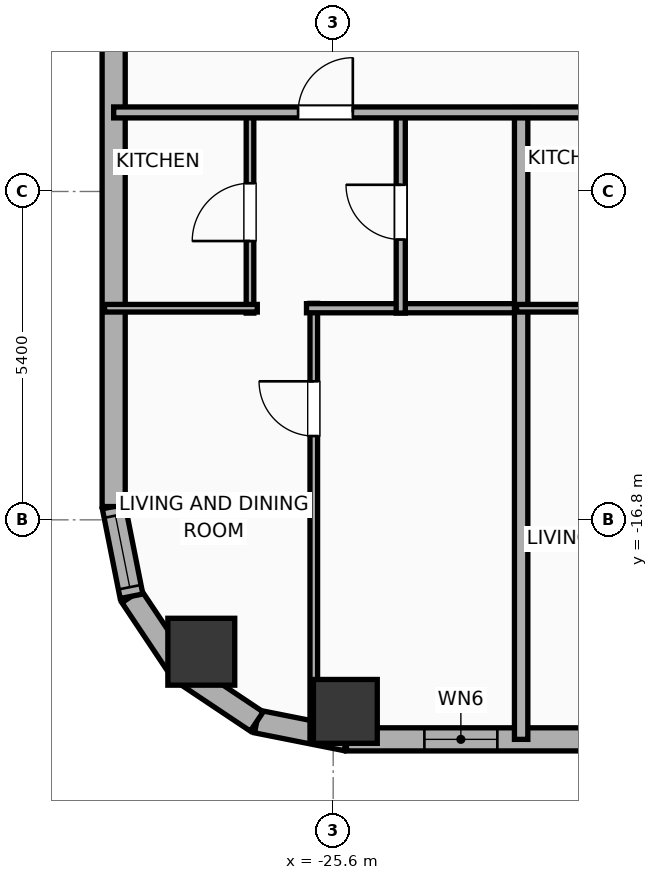
"""IFC4 building model, lengths in metres.
Left out: names, types, materials, properties, quantities, classifications, styles, units other than length and angle.
Written with IfcOpenShell. Run it as: python <this file> out.ifc"""

import sys

from ifc_helpers import new_model, si_unit, direction, frame, frame_2d, origin, origin_2d, place, context, subcontext, project, spatial, rectangle, hollow_rectangle, hollow_circle, extrude, element, fill, save


model = new_model("IFC4")
c1 = context("Model", 3, precision=1e-05, world=origin(), true_north=direction((0.0, 1.0)))
c2 = subcontext(c1, "Body", "Model", "MODEL_VIEW")
j1 = project(units=[si_unit("LENGTHUNIT", "METRE"), si_unit("PLANEANGLEUNIT", "RADIAN")], contexts=[c1])
p1 = place(None, origin())
s1 = spatial("IfcSite", under=j1, at=p1, CompositionType="ELEMENT")
p2 = place(p1, origin())
s2 = spatial("IfcBuilding", under=s1, at=p2, CompositionType="ELEMENT")
p3 = place(p2, frame((0.0, 0.0, 97.5)))
s3 = spatial("IfcBuildingStorey", under=s2, at=p3, CompositionType="ELEMENT", Elevation=97.5)
p4 = place(p3, frame((-25.4, -19.95, 0.0), z_axis=(0.0, 0.0, 1.0), x_axis=(1.0, 0.0, 0.0)))
e1 = element("IfcColumn", 1, at=p4, inside=s3, PredefinedType="COLUMN", context=c2, shape_type="SweptSolid", body=[
    extrude(hollow_rectangle(XDim=1.05, YDim=1.05, WallThickness=0.036, at=origin_2d()), origin(), (0.0, 0.0, 1.0), 3.9),
])
p5 = place(p3, frame((-27.769, -18.969, 0.0), z_axis=(0.0, 0.0, 1.0), x_axis=(1.0, 0.0, 0.0)))
e2 = element("IfcColumn", 2, at=p5, inside=s3, PredefinedType="COLUMN", context=c2, shape_type="SweptSolid", body=[
    extrude(hollow_circle(Radius=0.55, WallThickness=0.036, at=origin_2d()), origin(), (0.0, 0.0, 1.0), 3.9),
])
p6 = place(p3, frame((29.381, -20.41, 0.0), z_axis=(0.0, 0.0, 1.0), x_axis=(-1.0, 0.0, 0.0)))
e3 = element("IfcWall", 3, at=p6, inside=s3, PredefinedType="ELEMENTEDWALL", context=c2, shape_type="SweptSolid", body=[
    extrude(rectangle(XDim=54.763, YDim=0.38, at=frame_2d((27.381, 0.0))), origin(), (0.0, 0.0, 1.0), 3.65),
])
p7 = place(p6, frame((6.495, 0.0, 0.75)))
e4 = element("IfcOpeningElement", 4, at=p7, cuts=e3, PredefinedType="OPENING", context=c2, shape_type="SweptSolid", body=[
    extrude(rectangle(XDim=2.4, YDim=2.1, at=frame_2d((1.2, 1.05))), frame((0.0, 0.2, 0.0), z_axis=(0.0, -1.0, 0.0), x_axis=(1.0, 0.0, 0.0)), (0.0, 0.0, 1.0), 0.4),
])
p8 = place(p6, frame((17.686, 0.0, 0.75)))
e5 = element("IfcOpeningElement", 5, at=p8, cuts=e3, PredefinedType="OPENING", context=c2, shape_type="SweptSolid", body=[
    extrude(rectangle(XDim=2.4, YDim=2.1, at=frame_2d((1.2, 1.05))), frame((0.0, 0.2, 0.0), z_axis=(0.0, -1.0, 0.0), x_axis=(1.0, 0.0, 0.0)), (0.0, 0.0, 1.0), 0.4),
])
p9 = place(p6, frame((34.677, 0.0, 0.75)))
e6 = element("IfcOpeningElement", 6, at=p9, cuts=e3, PredefinedType="OPENING", context=c2, shape_type="SweptSolid", body=[
    extrude(rectangle(XDim=2.4, YDim=2.1, at=frame_2d((1.2, 1.05))), frame((0.0, 0.2, 0.0), z_axis=(0.0, -1.0, 0.0), x_axis=(1.0, 0.0, 0.0)), (0.0, 0.0, 1.0), 0.4),
])
p10 = place(p6, frame((45.867, 0.0, 0.75)))
e7 = element("IfcOpeningElement", 7, at=p10, cuts=e3, PredefinedType="OPENING", context=c2, shape_type="SweptSolid", body=[
    extrude(rectangle(XDim=2.4, YDim=2.1, at=frame_2d((1.2, 1.05))), frame((0.0, 0.2, 0.0), z_axis=(0.0, -1.0, 0.0), x_axis=(1.0, 0.0, 0.0)), (0.0, 0.0, 1.0), 0.4),
])
p11 = place(p6, frame((52.281, 0.0, 0.75)))
e8 = element("IfcOpeningElement", 8, at=p11, cuts=e3, PredefinedType="OPENING", context=c2, shape_type="SweptSolid", body=[
    extrude(rectangle(XDim=1.2, YDim=2.05, at=frame_2d((0.6, 1.025))), frame((0.0, 0.2, 0.0), z_axis=(0.0, -1.0, 0.0), x_axis=(1.0, 0.0, 0.0)), (0.0, 0.0, 1.0), 0.4),
])
p12 = place(p6, frame((49.641, 0.0, 0.75)))
e9 = element("IfcOpeningElement", 9, at=p12, cuts=e3, PredefinedType="OPENING", context=c2, shape_type="SweptSolid", body=[
    extrude(rectangle(XDim=1.2, YDim=2.05, at=frame_2d((0.6, 1.025))), frame((0.0, 0.2, 0.0), z_axis=(0.0, -1.0, 0.0), x_axis=(1.0, 0.0, 0.0)), (0.0, 0.0, 1.0), 0.4),
])
p13 = place(p6, frame((39.543, 0.0, 0.75)))
e10 = element("IfcOpeningElement", 10, at=p13, cuts=e3, PredefinedType="OPENING", context=c2, shape_type="SweptSolid", body=[
    extrude(rectangle(XDim=1.2, YDim=2.05, at=frame_2d((0.6, 1.025))), frame((0.0, 0.2, 0.0), z_axis=(0.0, -1.0, 0.0), x_axis=(1.0, 0.0, 0.0)), (0.0, 0.0, 1.0), 0.4),
])
p14 = place(p6, frame((44.538, 0.0, 0.75)))
e11 = element("IfcOpeningElement", 11, at=p14, cuts=e3, PredefinedType="OPENING", context=c2, shape_type="SweptSolid", body=[
    extrude(rectangle(XDim=0.52, YDim=2.05, at=frame_2d((0.26, 1.025))), frame((0.0, 0.2, 0.0), z_axis=(0.0, -1.0, 0.0), x_axis=(1.0, 0.0, 0.0)), (0.0, 0.0, 1.0), 0.4),
])
p15 = place(p6, frame((28.206, 0.0, 0.75)))
e12 = element("IfcOpeningElement", 12, at=p15, cuts=e3, PredefinedType="OPENING", context=c2, shape_type="SweptSolid", body=[
    extrude(rectangle(XDim=1.2, YDim=2.05, at=frame_2d((0.6, 1.025))), frame((0.0, 0.2, 0.0), z_axis=(0.0, -1.0, 0.0), x_axis=(1.0, 0.0, 0.0)), (0.0, 0.0, 1.0), 0.4),
])
p16 = place(p6, frame((31.241, 0.0, 0.75)))
e13 = element("IfcOpeningElement", 13, at=p16, cuts=e3, PredefinedType="OPENING", context=c2, shape_type="SweptSolid", body=[
    extrude(rectangle(XDim=0.85, YDim=2.05, at=frame_2d((0.425, 1.025))), frame((0.0, 0.2, 0.0), z_axis=(0.0, -1.0, 0.0), x_axis=(1.0, 0.0, 0.0)), (0.0, 0.0, 1.0), 0.4),
])
p17 = place(p6, frame((24.561, 0.0, 0.75)))
e14 = element("IfcOpeningElement", 14, at=p17, cuts=e3, PredefinedType="OPENING", context=c2, shape_type="SweptSolid", body=[
    extrude(rectangle(XDim=1.2, YDim=2.05, at=frame_2d((0.6, 1.025))), frame((0.0, 0.2, 0.0), z_axis=(0.0, -1.0, 0.0), x_axis=(1.0, 0.0, 0.0)), (0.0, 0.0, 1.0), 0.4),
])
p18 = place(p6, frame((22.561, 0.0, 0.75)))
e15 = element("IfcOpeningElement", 15, at=p18, cuts=e3, PredefinedType="OPENING", context=c2, shape_type="SweptSolid", body=[
    extrude(rectangle(XDim=0.52, YDim=2.05, at=frame_2d((0.26, 1.025))), frame((0.0, 0.2, 0.0), z_axis=(0.0, -1.0, 0.0), x_axis=(1.0, 0.0, 0.0)), (0.0, 0.0, 1.0), 0.4),
])
p19 = place(p6, frame((13.886, 0.0, 0.75)))
e16 = element("IfcOpeningElement", 16, at=p19, cuts=e3, PredefinedType="OPENING", context=c2, shape_type="SweptSolid", body=[
    extrude(rectangle(XDim=1.2, YDim=2.05, at=frame_2d((0.6, 1.025))), frame((0.0, 0.2, 0.0), z_axis=(0.0, -1.0, 0.0), x_axis=(1.0, 0.0, 0.0)), (0.0, 0.0, 1.0), 0.4),
])
p20 = place(p6, frame((11.694, 0.0, 0.75)))
e17 = element("IfcOpeningElement", 17, at=p20, cuts=e3, PredefinedType="OPENING", context=c2, shape_type="SweptSolid", body=[
    extrude(rectangle(XDim=0.85, YDim=2.05, at=frame_2d((0.425, 1.025))), frame((0.0, 0.2, 0.0), z_axis=(0.0, -1.0, 0.0), x_axis=(1.0, 0.0, 0.0)), (0.0, 0.0, 1.0), 0.4),
])
p21 = place(p6, frame((3.286, 0.0, 0.75)))
e18 = element("IfcOpeningElement", 18, at=p21, cuts=e3, PredefinedType="OPENING", context=c2, shape_type="SweptSolid", body=[
    extrude(rectangle(XDim=1.2, YDim=2.05, at=frame_2d((0.6, 1.025))), frame((0.0, 0.2, 0.0), z_axis=(0.0, -1.0, 0.0), x_axis=(1.0, 0.0, 0.0)), (0.0, 0.0, 1.0), 0.4),
])
p22 = place(p6, frame((0.816, 0.0, 0.75)))
e19 = element("IfcOpeningElement", 19, at=p22, cuts=e3, PredefinedType="OPENING", context=c2, shape_type="SweptSolid", body=[
    extrude(rectangle(XDim=1.2, YDim=2.05, at=frame_2d((0.6, 1.025))), frame((0.0, 0.2, 0.0), z_axis=(0.0, -1.0, 0.0), x_axis=(1.0, 0.0, 0.0)), (0.0, 0.0, 1.0), 0.4),
])
p23 = place(p3, frame((-25.381, -20.41, 0.0), z_axis=(0.0, 0.0, 1.0), x_axis=(-0.980786132421, 0.195086038585, 0.0)))
e20 = element("IfcWall", 20, at=p23, inside=s3, PredefinedType="ELEMENTEDWALL", context=c2, shape_type="SweptSolid", body=[
    extrude(rectangle(XDim=1.504, YDim=0.38, at=frame_2d((0.752, 0.0))), origin(), (0.0, 0.0, 1.0), 3.65),
])
p24 = place(p3, frame((-26.857, -20.116, 0.0), z_axis=(0.0, 0.0, 1.0), x_axis=(-0.831468045563, 0.555572577804, 0.0)))
e21 = element("IfcWall", 21, at=p24, inside=s3, PredefinedType="ELEMENTEDWALL", context=c2, shape_type="SweptSolid", body=[
    extrude(rectangle(XDim=1.485, YDim=0.38, at=frame_2d((0.742, 0.0))), origin(), (0.0, 0.0, 1.0), 3.65),
])
p25 = place(p3, frame((-28.091, -19.292, 0.0), z_axis=(0.0, 0.0, 1.0), x_axis=(-0.555610286119, 0.831442848281, 0.0)))
e22 = element("IfcWall", 22, at=p25, inside=s3, PredefinedType="ELEMENTEDWALL", context=c2, shape_type="SweptSolid", body=[
    extrude(rectangle(XDim=1.485, YDim=0.38, at=frame_2d((0.743, 0.0))), origin(), (0.0, 0.0, 1.0), 3.65),
])
p26 = place(p3, frame((-28.917, -18.057, 0.0), z_axis=(0.0, 0.0, 1.0), x_axis=(-0.195086038585, 0.980786132421, 0.0)))
e23 = element("IfcWall", 23, at=p26, inside=s3, PredefinedType="ELEMENTEDWALL", context=c2, shape_type="SweptSolid", body=[
    extrude(rectangle(XDim=1.504, YDim=0.38, at=frame_2d((0.752, 0.0))), origin(), (0.0, 0.0, 1.0), 3.65),
])
p27 = place(p26, frame((0.152, 0.0, 0.75)))
e24 = element("IfcOpeningElement", 24, at=p27, cuts=e23, PredefinedType="OPENING", context=c2, shape_type="SweptSolid", body=[
    extrude(rectangle(XDim=1.2, YDim=2.05, at=frame_2d((0.6, 1.025))), frame((0.0, 0.2, 0.0), z_axis=(0.0, -1.0, 0.0), x_axis=(1.0, 0.0, 0.0)), (0.0, 0.0, 1.0), 0.4),
])
p28 = place(p3, frame((-29.21, -16.581, 0.0), z_axis=(0.0, 0.0, 1.0), x_axis=(0.0, 1.0, 0.0)))
e25 = element("IfcWall", 25, at=p28, inside=s3, PredefinedType="ELEMENTEDWALL", context=c2, shape_type="SweptSolid", body=[
    extrude(rectangle(XDim=34.363, YDim=0.38, at=frame_2d((17.181, 0.0))), origin(), (0.0, 0.0, 1.0), 3.65),
])
p29 = place(p28, frame((31.087, 0.0, 0.75)))
e26 = element("IfcOpeningElement", 26, at=p29, cuts=e25, PredefinedType="OPENING", context=c2, shape_type="SweptSolid", body=[
    extrude(rectangle(XDim=1.2, YDim=2.05, at=frame_2d((0.6, 1.025))), frame((0.0, 0.2, 0.0), z_axis=(0.0, -1.0, 0.0), x_axis=(1.0, 0.0, 0.0)), (0.0, 0.0, 1.0), 0.4),
])
p30 = place(p28, frame((21.626, 0.0, 0.75)))
e27 = element("IfcOpeningElement", 27, at=p30, cuts=e25, PredefinedType="OPENING", context=c2, shape_type="SweptSolid", body=[
    extrude(rectangle(XDim=1.2, YDim=2.05, at=frame_2d((0.6, 1.025))), frame((0.0, 0.2, 0.0), z_axis=(0.0, -1.0, 0.0), x_axis=(1.0, 0.0, 0.0)), (0.0, 0.0, 1.0), 0.4),
])
p31 = place(p28, frame((10.551, 0.0, 0.75)))
e28 = element("IfcOpeningElement", 28, at=p31, cuts=e25, PredefinedType="OPENING", context=c2, shape_type="SweptSolid", body=[
    extrude(rectangle(XDim=1.2, YDim=2.05, at=frame_2d((0.6, 1.025))), frame((0.0, 0.2, 0.0), z_axis=(0.0, -1.0, 0.0), x_axis=(1.0, 0.0, 0.0)), (0.0, 0.0, 1.0), 0.4),
])
p32 = place(p3, frame((-25.919, -20.456, 0.0), z_axis=(0.0, 0.0, 1.0), x_axis=(0.0, 1.0, 0.0)))
e29 = element("IfcWall", 29, at=p32, inside=s3, PredefinedType="PARTITIONING", context=c2, shape_type="SweptSolid", body=[
    extrude(rectangle(XDim=7.216, YDim=0.125, at=frame_2d((3.608, 0.0))), origin(), (0.0, 0.0, 1.0), 3.65),
])
p33 = place(p32, frame((5.034, 0.0, 0.0)))
e30 = element("IfcOpeningElement", 30, at=p33, cuts=e29, PredefinedType="OPENING", context=c2, shape_type="SweptSolid", body=[
    extrude(rectangle(XDim=0.9, YDim=2.05, at=frame_2d((0.45, 1.025))), frame((0.0, 0.073, 0.0), z_axis=(0.0, -1.0, 0.0), x_axis=(1.0, 0.0, 0.0)), (0.0, 0.0, 1.0), 0.145),
])
p34 = place(p3, frame((-26.039, -13.32, 0.0), z_axis=(0.0, 0.0, 1.0), x_axis=(1.0, 0.0, 0.0)))
e31 = element("IfcWall", 31, at=p34, inside=s3, PredefinedType="PLUMBINGWALL", context=c2, shape_type="SweptSolid", body=[
    extrude(rectangle(XDim=3.605, YDim=0.15, at=frame_2d((1.802, 0.0))), origin(), (0.0, 0.0, 1.0), 3.65),
])
p35 = place(p3, frame((-26.968, -13.4, 0.0), z_axis=(0.0, 0.0, 1.0), x_axis=(0.0, 1.0, 0.0)))
e32 = element("IfcWall", 32, at=p35, inside=s3, PredefinedType="PARTITIONING", context=c2, shape_type="SweptSolid", body=[
    extrude(rectangle(XDim=3.32, YDim=0.125, at=frame_2d((1.66, 0.0))), origin(), (0.0, 0.0, 1.0), 3.65),
])
p36 = place(p35, frame((1.185, 0.0, 0.0)))
e33 = element("IfcOpeningElement", 33, at=p36, cuts=e32, PredefinedType="OPENING", context=c2, shape_type="SweptSolid", body=[
    extrude(rectangle(XDim=0.95, YDim=2.05, at=frame_2d((0.475, 1.025))), frame((0.0, 0.073, 0.0), z_axis=(0.0, -1.0, 0.0), x_axis=(1.0, 0.0, 0.0)), (0.0, 0.0, 1.0), 0.145),
])
p37 = place(p3, frame((-29.36, -13.32, 0.0), z_axis=(0.0, 0.0, 1.0), x_axis=(1.0, 0.0, 0.0)))
e34 = element("IfcWall", 34, at=p37, inside=s3, PredefinedType="PARTITIONING", context=c2, shape_type="SweptSolid", body=[
    extrude(rectangle(XDim=2.512, YDim=0.125, at=frame_2d((1.256, 0.0))), origin(), (0.0, 0.0, 1.0), 3.65),
])
p38 = place(p3, frame((-24.489, -13.4, 0.0), z_axis=(0.0, 0.0, 1.0), x_axis=(0.0, 1.0, 0.0)))
e35 = element("IfcWall", 35, at=p38, inside=s3, PredefinedType="PLUMBINGWALL", context=c2, shape_type="SweptSolid", body=[
    extrude(rectangle(XDim=3.32, YDim=0.15, at=frame_2d((1.66, 0.0))), origin(), (0.0, 0.0, 1.0), 3.65),
])
p39 = place(p38, frame((1.21, 0.0, 0.0)))
e36 = element("IfcOpeningElement", 36, at=p39, cuts=e35, PredefinedType="OPENING", context=c2, shape_type="SweptSolid", body=[
    extrude(rectangle(XDim=0.9, YDim=2.05, at=frame_2d((0.45, 1.025))), frame((0.0, 0.085, 0.0), z_axis=(0.0, -1.0, 0.0), x_axis=(1.0, 0.0, 0.0)), (0.0, 0.0, 1.0), 0.17),
])
p40 = place(p3, frame((-22.509, -20.41, 0.0), z_axis=(0.0, 0.0, 1.0), x_axis=(0.0, 1.0, 0.0)))
e37 = element("IfcWall", 37, at=p40, inside=s3, PredefinedType="PARTITIONING", context=c2, shape_type="SweptSolid", body=[
    extrude(rectangle(XDim=10.39, YDim=0.22, at=frame_2d((5.195, 0.0))), origin(), (0.0, 0.0, 1.0), 3.65),
])
p41 = place(p3, frame((-22.584, -13.32, 0.0), z_axis=(0.0, 0.0, 1.0), x_axis=(1.0, 0.0, 0.0)))
e38 = element("IfcWall", 38, at=p41, inside=s3, PredefinedType="PARTITIONING", context=c2, shape_type="SweptSolid", body=[
    extrude(rectangle(XDim=2.505, YDim=0.125, at=frame_2d((1.252, 0.0))), origin(), (0.0, 0.0, 1.0), 3.65),
])
p42 = place(p3, frame((-29.21, -10.1, 0.0), z_axis=(0.0, 0.0, 1.0), x_axis=(1.0, 0.0, 0.0)))
e39 = element("IfcWall", 39, at=p42, inside=s3, PredefinedType="PARTITIONING", context=c2, shape_type="SweptSolid", body=[
    extrude(rectangle(XDim=62.42, YDim=0.18, at=frame_2d((31.21, 0.0))), origin(), (0.0, 0.0, 1.0), 3.65),
])
p43 = place(p42, frame((3.033, 0.0, 0.0)))
e40 = element("IfcOpeningElement", 40, at=p43, cuts=e39, PredefinedType="OPENING", context=c2, shape_type="SweptSolid", body=[
    extrude(rectangle(XDim=0.9, YDim=2.05, at=frame_2d((0.45, 1.025))), frame((0.0, 0.1, 0.0), z_axis=(0.0, -1.0, 0.0), x_axis=(1.0, 0.0, 0.0)), (0.0, 0.0, 1.0), 0.2),
])
p44 = place(p42, frame((9.768, 0.0, 0.0)))
e41 = element("IfcOpeningElement", 41, at=p44, cuts=e39, PredefinedType="OPENING", context=c2, shape_type="SweptSolid", body=[
    extrude(rectangle(XDim=0.9, YDim=2.05, at=frame_2d((0.45, 1.025))), frame((0.0, 0.1, 0.0), z_axis=(0.0, -1.0, 0.0), x_axis=(1.0, 0.0, 0.0)), (0.0, 0.0, 1.0), 0.2),
])
p45 = place(p42, frame((18.65, 0.0, 0.0)))
e42 = element("IfcOpeningElement", 42, at=p45, cuts=e39, PredefinedType="OPENING", context=c2, shape_type="SweptSolid", body=[
    extrude(rectangle(XDim=1.15, YDim=2.05, at=frame_2d((0.575, 1.025))), frame((0.0, 0.1, 0.0), z_axis=(0.0, -1.0, 0.0), x_axis=(1.0, 0.0, 0.0)), (0.0, 0.0, 1.0), 0.2),
])
p46 = place(p42, frame((29.212, 0.0, 0.0)))
e43 = element("IfcOpeningElement", 43, at=p46, cuts=e39, PredefinedType="OPENING", context=c2, shape_type="SweptSolid", body=[
    extrude(rectangle(XDim=1.15, YDim=2.05, at=frame_2d((0.575, 1.025))), frame((0.0, 0.1, 0.0), z_axis=(0.0, -1.0, 0.0), x_axis=(1.0, 0.0, 0.0)), (0.0, 0.0, 1.0), 0.2),
])
p47 = place(p42, frame((40.379, 0.0, 0.0)))
e44 = element("IfcOpeningElement", 44, at=p47, cuts=e39, PredefinedType="OPENING", context=c2, shape_type="SweptSolid", body=[
    extrude(rectangle(XDim=1.15, YDim=2.05, at=frame_2d((0.575, 1.025))), frame((0.0, 0.1, 0.0), z_axis=(0.0, -1.0, 0.0), x_axis=(1.0, 0.0, 0.0)), (0.0, 0.0, 1.0), 0.2),
])
p48 = place(p42, frame((50.959, 0.0, 0.0)))
e45 = element("IfcOpeningElement", 45, at=p48, cuts=e39, PredefinedType="OPENING", context=c2, shape_type="SweptSolid", body=[
    extrude(rectangle(XDim=1.15, YDim=2.05, at=frame_2d((0.575, 1.025))), frame((0.0, 0.1, 0.0), z_axis=(0.0, -1.0, 0.0), x_axis=(1.0, 0.0, 0.0)), (0.0, 0.0, 1.0), 0.2),
])
p49 = place(p42, frame((59.117, 0.0, 0.0)))
e46 = element("IfcOpeningElement", 46, at=p49, cuts=e39, PredefinedType="OPENING", context=c2, shape_type="SweptSolid", body=[
    extrude(rectangle(XDim=0.9, YDim=2.05, at=frame_2d((0.45, 1.025))), frame((0.0, 0.1, 0.0), z_axis=(0.0, -1.0, 0.0), x_axis=(1.0, 0.0, 0.0)), (0.0, 0.0, 1.0), 0.2),
])
p50 = place(p27, origin())
e47 = element("IfcWindow", 47, at=p50, inside=s3, PartitioningType="SINGLE_PANEL", PredefinedType="WINDOW", context=c2, shape_type="SweptSolid", body=[
    extrude(rectangle(XDim=1.2, YDim=2.05, at=frame_2d((0.6, 1.025))), frame((0.0, 0.03, 0.0), z_axis=(0.0, -1.0, 0.0), x_axis=(1.0, 0.0, 0.0)), (0.0, 0.0, 1.0), 0.06),
])
fill(e24, e47)
p51 = place(p11, origin())
e48 = element("IfcWindow", 48, at=p51, inside=s3, PartitioningType="SINGLE_PANEL", PredefinedType="WINDOW", context=c2, shape_type="SweptSolid", body=[
    extrude(rectangle(XDim=1.2, YDim=2.05, at=frame_2d((0.6, 1.025))), frame((0.0, 0.03, 0.0), z_axis=(0.0, -1.0, 0.0), x_axis=(1.0, 0.0, 0.0)), (0.0, 0.0, 1.0), 0.06),
])
fill(e8, e48)
p52 = place(p33, origin())
e49 = element("IfcDoor", 49, at=p52, inside=s3, OperationType="SINGLE_SWING_RIGHT", PredefinedType="DOOR", context=c2, shape_type="SweptSolid", body=[
    extrude(rectangle(XDim=0.9, YDim=2.05, at=frame_2d((0.45, 1.025))), frame((0.0, 0.025, 0.0), z_axis=(0.0, -1.0, 0.0), x_axis=(1.0, 0.0, 0.0)), (0.0, 0.0, 1.0), 0.05),
])
fill(e30, e49)
p53 = place(p36, origin())
e50 = element("IfcDoor", 50, at=p53, inside=s3, OperationType="SINGLE_SWING_LEFT", PredefinedType="DOOR", context=c2, shape_type="SweptSolid", body=[
    extrude(rectangle(XDim=0.95, YDim=2.05, at=frame_2d((0.475, 1.025))), frame((0.0, 0.025, 0.0), z_axis=(0.0, -1.0, 0.0), x_axis=(1.0, 0.0, 0.0)), (0.0, 0.0, 1.0), 0.05),
])
fill(e33, e50)
p54 = place(p39, origin())
e51 = element("IfcDoor", 51, at=p54, inside=s3, OperationType="SINGLE_SWING_RIGHT", PredefinedType="DOOR", context=c2, shape_type="SweptSolid", body=[
    extrude(rectangle(XDim=0.9, YDim=2.05, at=frame_2d((0.45, 1.025))), frame((0.0, 0.025, 0.0), z_axis=(0.0, -1.0, 0.0), x_axis=(1.0, 0.0, 0.0)), (0.0, 0.0, 1.0), 0.05),
])
fill(e36, e51)
p55 = place(p43, origin())
e52 = element("IfcDoor", 52, at=p55, inside=s3, OperationType="SINGLE_SWING_RIGHT", PredefinedType="DOOR", context=c2, shape_type="SweptSolid", body=[
    extrude(rectangle(XDim=0.9, YDim=2.05, at=frame_2d((0.45, 1.025))), frame((0.0, 0.025, 0.0), z_axis=(0.0, -1.0, 0.0), x_axis=(1.0, 0.0, 0.0)), (0.0, 0.0, 1.0), 0.05),
])
fill(e40, e52)
save(model, sys.argv[1])
